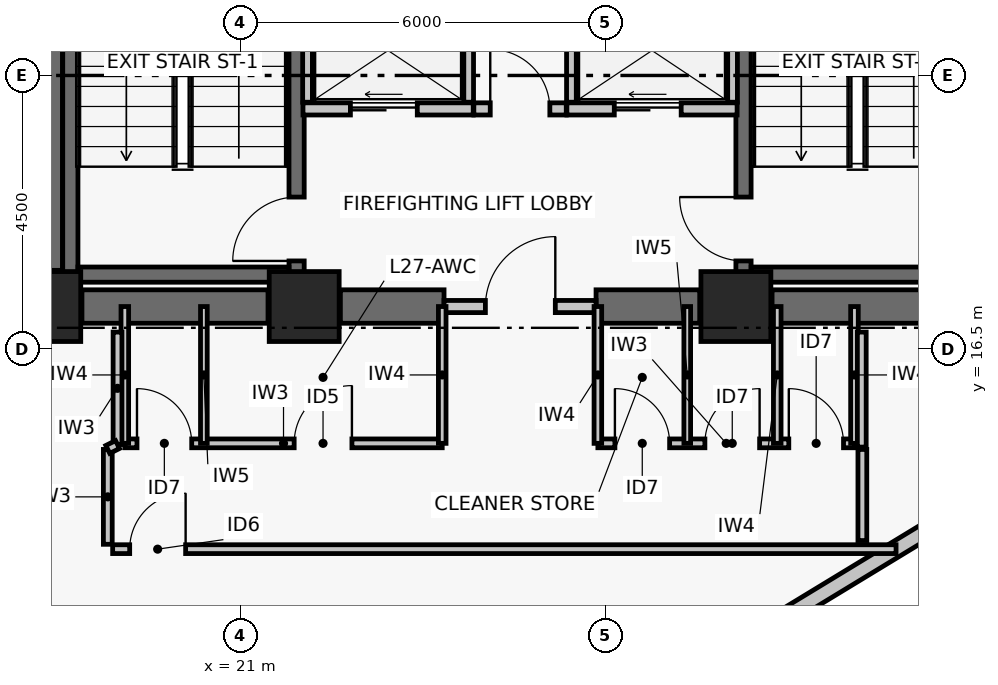
"""IFC4 building model, lengths in metres.
Left out: names, types, materials, properties, quantities, classifications, styles, units other than length and angle.
Written with IfcOpenShell. Run it as: python <this file> out.ifc"""

import sys

from ifc_helpers import new_model, si_unit, direction, frame, frame_2d, origin, origin_2d, place, context, subcontext, project, spatial, rectangle, extrude, element, fill, save


model = new_model("IFC4")
c1 = context("Model", 3, precision=1e-05, world=origin(), true_north=direction((0.0, 1.0)))
c2 = subcontext(c1, "Body", "Model", "MODEL_VIEW")
j1 = project(units=[si_unit("LENGTHUNIT", "METRE"), si_unit("PLANEANGLEUNIT", "RADIAN")], contexts=[c1])
p1 = place(None, origin())
s1 = spatial("IfcSite", under=j1, at=p1, CompositionType="ELEMENT")
p2 = place(p1, origin())
s2 = spatial("IfcBuilding", under=s1, at=p2, CompositionType="ELEMENT")
p3 = place(p2, frame((0.0, 0.0, 111.42)))
s3 = spatial("IfcBuildingStorey", under=s2, at=p3, CompositionType="ELEMENT", Elevation=111.42)
for number, where, z_axis, x_axis in (
    (1, (17.8, 17.2, 0.0), (0.0, 0.0, 1.0), (1.0, 0.0, 0.0)),
    (2, (22.05, 17.2, 0.0), (0.0, 0.0, 1.0), (1.0, 0.0, 0.0)),
    (3, (29.15, 17.2, 0.0), (0.0, 0.0, 1.0), (1.0, 0.0, 0.0)),
):
    element("IfcColumn", number, at=place(p3, frame(where, z_axis=z_axis, x_axis=x_axis)), inside=s3, PredefinedType="COLUMN", context=c2, shape_type="SweptSolid", body=[
        extrude(rectangle(XDim=1.15, YDim=1.15, at=origin_2d()), origin(), (0.0, 0.0, 1.0), 3.72),
    ])
p4 = place(p3, frame((18.395, 17.2, 0.0), z_axis=(0.0, 0.0, 1.0), x_axis=(1.0, 0.0, 0.0)))
e4 = element("IfcWall", 4, at=p4, inside=s3, PredefinedType="SHEAR", context=c2, shape_type="SweptSolid", body=[
    extrude(rectangle(XDim=3.06, YDim=0.55, at=frame_2d((1.53, 0.0))), origin(), (0.0, 0.0, 1.0), 3.47),
])
p5 = place(p3, frame((22.645, 17.2, 0.0), z_axis=(0.0, 0.0, 1.0), x_axis=(1.0, 0.0, 0.0)))
e5 = element("IfcWall", 5, at=p5, inside=s3, PredefinedType="SHEAR", context=c2, shape_type="SweptSolid", body=[
    extrude(rectangle(XDim=1.705, YDim=0.55, at=frame_2d((0.853, 0.0))), origin(), (0.0, 0.0, 1.0), 3.47),
])
p6 = place(p3, frame((26.85, 17.2, 0.0), z_axis=(0.0, 0.0, 1.0), x_axis=(1.0, 0.0, 0.0)))
e6 = element("IfcWall", 6, at=p6, inside=s3, PredefinedType="SHEAR", context=c2, shape_type="SweptSolid", body=[
    extrude(rectangle(XDim=1.705, YDim=0.55, at=frame_2d((0.853, 0.0))), origin(), (0.0, 0.0, 1.0), 3.47),
])
p7 = place(p3, frame((29.745, 17.2, 0.0), z_axis=(0.0, 0.0, 1.0), x_axis=(1.0, 0.0, 0.0)))
e7 = element("IfcWall", 7, at=p7, inside=s3, PredefinedType="SHEAR", context=c2, shape_type="SweptSolid", body=[
    extrude(rectangle(XDim=3.06, YDim=0.55, at=frame_2d((1.53, 0.0))), origin(), (0.0, 0.0, 1.0), 3.47),
])
p8 = place(p3, frame((17.8, 17.795, 0.0), z_axis=(0.0, 0.0, 1.0), x_axis=(0.0, 1.0, 0.0)))
e8 = element("IfcWall", 8, at=p8, inside=s3, PredefinedType="SHEAR", context=c2, shape_type="SweptSolid", body=[
    extrude(rectangle(XDim=8.41, YDim=0.55, at=frame_2d((4.205, 0.0))), origin(), (0.0, 0.0, 1.0), 3.47),
])
p9 = place(p3, frame((18.204, 17.6, 0.0), z_axis=(0.0, 0.0, 1.0), x_axis=(0.0, 1.0, 0.0)))
e9 = element("IfcWall", 9, at=p9, inside=s3, PredefinedType="SHEAR", context=c2, shape_type="SweptSolid", body=[
    extrude(rectangle(XDim=8.8, YDim=0.25, at=frame_2d((4.4, 0.0))), origin(), (0.0, 0.0, 1.0), 3.47),
])
p10 = place(p3, frame((21.925, 17.6, 0.0), z_axis=(0.0, 0.0, 1.0), x_axis=(0.0, 1.0, 0.0)))
e10 = element("IfcWall", 10, at=p10, inside=s3, PredefinedType="SHEAR", context=c2, shape_type="SweptSolid", body=[
    extrude(rectangle(XDim=8.8, YDim=0.25, at=frame_2d((4.4, 0.0))), origin(), (0.0, 0.0, 1.0), 3.47),
])
p11 = place(p10, frame((0.35, 0.0, 0.0)))
e11 = element("IfcOpeningElement", 11, at=p11, cuts=e10, PredefinedType="OPENING", context=c2, shape_type="SweptSolid", body=[
    extrude(rectangle(XDim=1.05, YDim=2.08, at=frame_2d((0.525, 1.04))), frame((0.0, 0.135, 0.0), z_axis=(0.0, -1.0, 0.0), x_axis=(1.0, 0.0, 0.0)), (0.0, 0.0, 1.0), 0.27),
])
p12 = place(p3, frame((18.329, 17.725, 0.0), z_axis=(0.0, 0.0, 1.0), x_axis=(1.0, 0.0, 0.0)))
e12 = element("IfcWall", 12, at=p12, inside=s3, PredefinedType="SHEAR", context=c2, shape_type="SweptSolid", body=[
    extrude(rectangle(XDim=3.471, YDim=0.25, at=frame_2d((1.735, 0.0))), origin(), (0.0, 0.0, 1.0), 3.47),
])
p13 = place(p3, frame((29.275, 17.6, 0.0), z_axis=(0.0, 0.0, 1.0), x_axis=(0.0, 1.0, 0.0)))
e13 = element("IfcWall", 13, at=p13, inside=s3, PredefinedType="SHEAR", context=c2, shape_type="SweptSolid", body=[
    extrude(rectangle(XDim=8.8, YDim=0.25, at=frame_2d((4.4, 0.0))), origin(), (0.0, 0.0, 1.0), 3.47),
])
p14 = place(p13, frame((0.35, 0.0, 0.0)))
e14 = element("IfcOpeningElement", 14, at=p14, cuts=e13, PredefinedType="OPENING", context=c2, shape_type="SweptSolid", body=[
    extrude(rectangle(XDim=1.05, YDim=2.08, at=frame_2d((0.525, 1.04))), frame((0.0, 0.135, 0.0), z_axis=(0.0, -1.0, 0.0), x_axis=(1.0, 0.0, 0.0)), (0.0, 0.0, 1.0), 0.27),
])
p15 = place(p3, frame((29.4, 17.725, 0.0), z_axis=(0.0, 0.0, 1.0), x_axis=(1.0, 0.0, 0.0)))
e15 = element("IfcWall", 15, at=p15, inside=s3, PredefinedType="SHEAR", context=c2, shape_type="SweptSolid", body=[
    extrude(rectangle(XDim=3.471, YDim=0.25, at=frame_2d((1.736, 0.0))), origin(), (0.0, 0.0, 1.0), 3.47),
])
p16 = place(p3, frame((35.48, 15.455, 0.0), z_axis=(0.0, 0.0, 1.0), x_axis=(-0.854673977685, -0.51916509115, 0.0)))
e16 = element("IfcWall", 16, at=p16, inside=s3, PredefinedType="PARTITIONING", context=c2, shape_type="SweptSolid", body=[
    extrude(rectangle(XDim=6.678, YDim=0.26, at=frame_2d((3.339, 0.0))), origin(), (0.0, 0.0, 1.0), 3.47),
])
p17 = place(p3, frame((24.35, 17.2, 0.0), z_axis=(0.0, 0.0, 1.0), x_axis=(1.0, 0.0, 0.0)))
e17 = element("IfcWall", 17, at=p17, inside=s3, PredefinedType="PARTITIONING", context=c2, shape_type="SweptSolid", body=[
    extrude(rectangle(XDim=2.5, YDim=0.2, at=frame_2d((1.25, 0.0))), origin(), (0.0, 0.0, 1.0), 2.6),
])
p18 = place(p17, frame((0.68, 0.0, 0.0)))
e18 = element("IfcOpeningElement", 18, at=p18, cuts=e17, PredefinedType="OPENING", context=c2, shape_type="SweptSolid", body=[
    extrude(rectangle(XDim=1.15, YDim=2.08, at=frame_2d((0.575, 1.04))), frame((0.0, 0.11, 0.0), z_axis=(0.0, -1.0, 0.0), x_axis=(1.0, 0.0, 0.0)), (0.0, 0.0, 1.0), 0.22),
])
p19 = place(p3, frame((24.84, 20.45, 0.0), z_axis=(0.0, 0.0, 1.0), x_axis=(1.0, 0.0, 0.0)))
e19 = element("IfcWall", 19, at=p19, inside=s3, PredefinedType="PARTITIONING", context=c2, shape_type="SweptSolid", body=[
    extrude(rectangle(XDim=1.52, YDim=0.2, at=frame_2d((0.76, 0.0))), origin(), (0.0, 0.0, 1.0), 3.47),
])
p20 = place(p19, frame((0.27, 0.0, 0.0)))
e20 = element("IfcOpeningElement", 20, at=p20, cuts=e19, PredefinedType="OPENING", context=c2, shape_type="SweptSolid", body=[
    extrude(rectangle(XDim=0.98, YDim=2.06, at=frame_2d((0.49, 1.03))), frame((0.0, 0.11, 0.0), z_axis=(0.0, -1.0, 0.0), x_axis=(1.0, 0.0, 0.0)), (0.0, 0.0, 1.0), 0.22),
])
p21 = place(p3, frame((22.03, 20.45, 0.0), z_axis=(0.0, 0.0, 1.0), x_axis=(1.0, 0.0, 0.0)))
e21 = element("IfcWall", 21, at=p21, inside=s3, PredefinedType="PARTITIONING", context=c2, shape_type="SweptSolid", body=[
    extrude(rectangle(XDim=2.8, YDim=0.2, at=frame_2d((1.4, 0.0))), origin(), (0.0, 0.0, 1.0), 3.47),
])
p22 = place(p21, frame((0.78, 0.0, 0.0)))
e22 = element("IfcOpeningElement", 22, at=p22, cuts=e21, PredefinedType="OPENING", context=c2, shape_type="SweptSolid", body=[
    extrude(rectangle(XDim=1.1, YDim=2.08, at=frame_2d((0.55, 1.04))), frame((0.0, 0.11, 0.0), z_axis=(0.0, -1.0, 0.0), x_axis=(1.0, 0.0, 0.0)), (0.0, 0.0, 1.0), 0.22),
])
p23 = place(p3, frame((26.37, 20.45, 0.0), z_axis=(0.0, 0.0, 1.0), x_axis=(1.0, 0.0, 0.0)))
e23 = element("IfcWall", 23, at=p23, inside=s3, PredefinedType="PARTITIONING", context=c2, shape_type="SweptSolid", body=[
    extrude(rectangle(XDim=2.8, YDim=0.2, at=frame_2d((1.4, 0.0))), origin(), (0.0, 0.0, 1.0), 3.47),
])
p24 = place(p23, frame((0.78, 0.0, 0.0)))
e24 = element("IfcOpeningElement", 24, at=p24, cuts=e23, PredefinedType="OPENING", context=c2, shape_type="SweptSolid", body=[
    extrude(rectangle(XDim=1.1, YDim=2.08, at=frame_2d((0.55, 1.04))), frame((0.0, 0.11, 0.0), z_axis=(0.0, -1.0, 0.0), x_axis=(1.0, 0.0, 0.0)), (0.0, 0.0, 1.0), 0.22),
])
for number, where, z_axis, x_axis in (
    (25, (22.105, 20.56, 0.0), (0.0, 0.0, 1.0), (0.0, 1.0, 0.0)),
    (26, (24.755, 20.56, 0.0), (0.0, 0.0, 1.0), (0.0, 1.0, 0.0)),
):
    element("IfcWall", number, at=place(p3, frame(where, z_axis=z_axis, x_axis=x_axis)), inside=s3, PredefinedType="PARTITIONING", context=c2, shape_type="SweptSolid", body=[
        extrude(rectangle(XDim=1.71, YDim=0.16, at=frame_2d((0.855, 0.0))), origin(), (0.0, 0.0, 1.0), 3.47),
    ])
p25 = place(p3, frame((29.095, 20.56, 0.0), z_axis=(0.0, 0.0, 1.0), x_axis=(0.0, 1.0, 0.0)))
e27 = element("IfcWall", 27, at=p25, inside=s3, PredefinedType="PARTITIONING", context=c2, shape_type="SweptSolid", body=[
    extrude(rectangle(XDim=5.45, YDim=0.16, at=frame_2d((2.725, 0.0))), origin(), (0.0, 0.0, 1.0), 3.47),
])
p26 = place(p3, frame((26.445, 20.56, 0.0), z_axis=(0.0, 0.0, 1.0), x_axis=(0.0, 1.0, 0.0)))
e28 = element("IfcWall", 28, at=p26, inside=s3, PredefinedType="PARTITIONING", context=c2, shape_type="SweptSolid", body=[
    extrude(rectangle(XDim=1.71, YDim=0.16, at=frame_2d((0.855, 0.0))), origin(), (0.0, 0.0, 1.0), 3.47),
])
p27 = place(p3, frame((19.1, 14.95, 0.0), z_axis=(0.0, 0.0, 1.0), x_axis=(1.0, 0.0, 0.0)))
e29 = element("IfcWall", 29, at=p27, inside=s3, PredefinedType="PARTITIONING", context=c2, shape_type="SweptSolid", body=[
    extrude(rectangle(XDim=5.22, YDim=0.145, at=frame_2d((2.61, 0.0))), origin(), (0.0, 0.0, 1.0), 2.65),
])
p28 = place(p27, frame((0.2, 0.0, 0.0)))
e30 = element("IfcOpeningElement", 30, at=p28, cuts=e29, PredefinedType="OPENING", context=c2, shape_type="SweptSolid", body=[
    extrude(rectangle(XDim=0.9, YDim=2.02, at=frame_2d((0.45, 1.01))), frame((0.0, 0.083, 0.0), z_axis=(0.0, -1.0, 0.0), x_axis=(1.0, 0.0, 0.0)), (0.0, 0.0, 1.0), 0.165),
])
p29 = place(p27, frame((2.785, 0.0, 0.0)))
e31 = element("IfcOpeningElement", 31, at=p29, cuts=e29, PredefinedType="OPENING", context=c2, shape_type="SweptSolid", body=[
    extrude(rectangle(XDim=0.95, YDim=2.06, at=frame_2d((0.475, 1.03))), frame((0.0, 0.083, 0.0), z_axis=(0.0, -1.0, 0.0), x_axis=(1.0, 0.0, 0.0)), (0.0, 0.0, 1.0), 0.165),
])
p30 = place(p3, frame((26.88, 14.95, 0.0), z_axis=(0.0, 0.0, 1.0), x_axis=(1.0, 0.0, 0.0)))
e32 = element("IfcWall", 32, at=p30, inside=s3, PredefinedType="PARTITIONING", context=c2, shape_type="SweptSolid", body=[
    extrude(rectangle(XDim=4.22, YDim=0.145, at=frame_2d((2.11, 0.0))), origin(), (0.0, 0.0, 1.0), 3.05),
])
p31 = place(p30, frame((0.28, 0.0, 0.0)))
e33 = element("IfcOpeningElement", 33, at=p31, cuts=e32, PredefinedType="OPENING", context=c2, shape_type="SweptSolid", body=[
    extrude(rectangle(XDim=0.9, YDim=2.02, at=frame_2d((0.45, 1.01))), frame((0.0, 0.083, 0.0), z_axis=(0.0, -1.0, 0.0), x_axis=(1.0, 0.0, 0.0)), (0.0, 0.0, 1.0), 0.165),
])
p32 = place(p30, frame((1.76, 0.0, 0.0)))
e34 = element("IfcOpeningElement", 34, at=p32, cuts=e32, PredefinedType="OPENING", context=c2, shape_type="SweptSolid", body=[
    extrude(rectangle(XDim=0.9, YDim=2.02, at=frame_2d((0.45, 1.01))), frame((0.0, 0.083, 0.0), z_axis=(0.0, -1.0, 0.0), x_axis=(1.0, 0.0, 0.0)), (0.0, 0.0, 1.0), 0.165),
])
p33 = place(p30, frame((3.14, 0.0, 0.0)))
e35 = element("IfcOpeningElement", 35, at=p33, cuts=e32, PredefinedType="OPENING", context=c2, shape_type="SweptSolid", body=[
    extrude(rectangle(XDim=0.9, YDim=2.02, at=frame_2d((0.45, 1.01))), frame((0.0, 0.083, 0.0), z_axis=(0.0, -1.0, 0.0), x_axis=(1.0, 0.0, 0.0)), (0.0, 0.0, 1.0), 0.165),
])
p34 = place(p3, frame((19.1, 14.95, 0.0), z_axis=(0.0, 0.0, 1.0), x_axis=(0.0, 1.0, 0.0)))
e36 = element("IfcWall", 36, at=p34, inside=s3, PredefinedType="PARTITIONING", context=c2, shape_type="SweptSolid", body=[
    extrude(rectangle(XDim=2.25, YDim=0.125, at=frame_2d((1.125, 0.0))), origin(), (0.0, 0.0, 1.0), 2.6),
])
p35 = place(p3, frame((20.4, 14.95, 0.0), z_axis=(0.0, 0.0, 1.0), x_axis=(0.0, 1.0, 0.0)))
e37 = element("IfcWall", 37, at=p35, inside=s3, PredefinedType="PARTITIONING", context=c2, shape_type="SweptSolid", body=[
    extrude(rectangle(XDim=2.25, YDim=0.11, at=frame_2d((1.125, 0.0))), origin(), (0.0, 0.0, 1.0), 2.6),
])
for number, where, z_axis, x_axis in (
    (38, (24.32, 14.95, 0.0), (0.0, 0.0, 1.0), (0.0, 1.0, 0.0)),
    (39, (26.88, 14.95, 0.0), (0.0, 0.0, 1.0), (0.0, 1.0, 0.0)),
):
    element("IfcWall", number, at=place(p3, frame(where, z_axis=z_axis, x_axis=x_axis)), inside=s3, PredefinedType="PARTITIONING", context=c2, shape_type="SweptSolid", body=[
        extrude(rectangle(XDim=2.25, YDim=0.125, at=frame_2d((1.125, 0.0))), origin(), (0.0, 0.0, 1.0), 2.6),
    ])
p36 = place(p3, frame((28.35, 14.95, 0.0), z_axis=(0.0, 0.0, 1.0), x_axis=(0.0, 1.0, 0.0)))
e40 = element("IfcWall", 40, at=p36, inside=s3, PredefinedType="PARTITIONING", context=c2, shape_type="SweptSolid", body=[
    extrude(rectangle(XDim=2.25, YDim=0.11, at=frame_2d((1.125, 0.0))), origin(), (0.0, 0.0, 1.0), 2.6),
])
for number, where, z_axis, x_axis in (
    (41, (29.83, 14.95, 0.0), (0.0, 0.0, 1.0), (0.0, 1.0, 0.0)),
    (42, (31.1, 14.95, 0.0), (0.0, 0.0, 1.0), (0.0, 1.0, 0.0)),
):
    element("IfcWall", number, at=place(p3, frame(where, z_axis=z_axis, x_axis=x_axis)), inside=s3, PredefinedType="PARTITIONING", context=c2, shape_type="SweptSolid", body=[
        extrude(rectangle(XDim=2.25, YDim=0.125, at=frame_2d((1.125, 0.0))), origin(), (0.0, 0.0, 1.0), 2.6),
    ])
p37 = place(p3, frame((18.98, 16.78, 0.0), z_axis=(0.0, 0.0, 1.0), x_axis=(0.0, -1.0, 0.0)))
e43 = element("IfcWall", 43, at=p37, inside=s3, PredefinedType="PARTITIONING", context=c2, shape_type="SweptSolid", body=[
    extrude(rectangle(XDim=1.85, YDim=0.145, at=frame_2d((0.925, 0.0))), origin(), (0.0, 0.0, 1.0), 2.6),
])
p38 = place(p3, frame((18.82, 14.85, 0.0), z_axis=(0.0, 0.0, 1.0), x_axis=(0.0, -1.0, 0.0)))
e44 = element("IfcWall", 44, at=p38, inside=s3, PredefinedType="PARTITIONING", context=c2, shape_type="SweptSolid", body=[
    extrude(rectangle(XDim=1.56, YDim=0.145, at=frame_2d((0.78, 0.0))), origin(), (0.0, 0.0, 1.0), 3.05),
])
p39 = place(p3, frame((18.9, 13.21, 0.0), z_axis=(0.0, 0.0, 1.0), x_axis=(1.0, 0.0, 0.0)))
e45 = element("IfcWall", 45, at=p39, inside=s3, PredefinedType="PARTITIONING", context=c2, shape_type="SweptSolid", body=[
    extrude(rectangle(XDim=12.884, YDim=0.145, at=frame_2d((6.442, 0.0))), origin(), (0.0, 0.0, 1.0), 2.65),
])
p40 = place(p39, frame((0.28, 0.0, 0.0)))
e46 = element("IfcOpeningElement", 46, at=p40, cuts=e45, PredefinedType="OPENING", context=c2, shape_type="SweptSolid", body=[
    extrude(rectangle(XDim=0.92, YDim=2.05, at=frame_2d((0.46, 1.025))), frame((0.0, 0.083, 0.0), z_axis=(0.0, -1.0, 0.0), x_axis=(1.0, 0.0, 0.0)), (0.0, 0.0, 1.0), 0.165),
])
p41 = place(p3, frame((31.23, 13.351, 0.0), z_axis=(0.0, 0.0, 1.0), x_axis=(0.0, 1.0, 0.0)))
e47 = element("IfcWall", 47, at=p41, inside=s3, PredefinedType="PARTITIONING", context=c2, shape_type="SweptSolid", body=[
    extrude(rectangle(XDim=1.499, YDim=0.145, at=frame_2d((0.75, 0.0))), origin(), (0.0, 0.0, 1.0), 2.9),
])
p42 = place(p3, frame((31.22, 14.889, 0.0), z_axis=(0.0, 0.0, 1.0), x_axis=(0.0, 1.0, 0.0)))
e48 = element("IfcWall", 48, at=p42, inside=s3, PredefinedType="PARTITIONING", context=c2, shape_type="SweptSolid", body=[
    extrude(rectangle(XDim=1.891, YDim=0.145, at=frame_2d((0.946, 0.0))), origin(), (0.0, 0.0, 1.0), 2.6),
])
p43 = place(p3, frame((18.82, 14.85, 0.0), z_axis=(0.0, 0.0, 1.0), x_axis=(0.89470021502, 0.446667130247, 0.0)))
e49 = element("IfcWall", 49, at=p43, inside=s3, PredefinedType="PARTITIONING", context=c2, shape_type="SweptSolid", body=[
    extrude(rectangle(XDim=0.179, YDim=0.145, at=frame_2d((0.089, 0.0))), origin(), (0.0, 0.0, 1.0), 3.47),
])
p44 = place(p11, origin())
e50 = element("IfcDoor", 50, at=p44, inside=s3, OperationType="SINGLE_SWING_LEFT", PredefinedType="DOOR", context=c2, shape_type="SweptSolid", body=[
    extrude(rectangle(XDim=1.05, YDim=2.08, at=frame_2d((0.525, 1.04))), frame((0.0, 0.025, 0.0), z_axis=(0.0, -1.0, 0.0), x_axis=(1.0, 0.0, 0.0)), (0.0, 0.0, 1.0), 0.05),
])
fill(e11, e50)
p45 = place(p14, origin())
e51 = element("IfcDoor", 51, at=p45, inside=s3, OperationType="SINGLE_SWING_RIGHT", PredefinedType="DOOR", context=c2, shape_type="SweptSolid", body=[
    extrude(rectangle(XDim=1.05, YDim=2.08, at=frame_2d((0.525, 1.04))), frame((0.0, 0.025, 0.0), z_axis=(0.0, -1.0, 0.0), x_axis=(1.0, 0.0, 0.0)), (0.0, 0.0, 1.0), 0.05),
])
fill(e14, e51)
p46 = place(p18, origin())
e52 = element("IfcDoor", 52, at=p46, inside=s3, OperationType="SINGLE_SWING_RIGHT", PredefinedType="DOOR", context=c2, shape_type="SweptSolid", body=[
    extrude(rectangle(XDim=1.15, YDim=2.08, at=frame_2d((0.575, 1.04))), frame((0.0, 0.025, 0.0), z_axis=(0.0, -1.0, 0.0), x_axis=(1.0, 0.0, 0.0)), (0.0, 0.0, 1.0), 0.05),
])
fill(e18, e52)
p47 = place(p20, origin())
e53 = element("IfcDoor", 53, at=p47, inside=s3, OperationType="SINGLE_SWING_LEFT", PredefinedType="DOOR", context=c2, shape_type="SweptSolid", body=[
    extrude(rectangle(XDim=0.98, YDim=2.06, at=frame_2d((0.49, 1.03))), frame((0.0, 0.025, 0.0), z_axis=(0.0, -1.0, 0.0), x_axis=(1.0, 0.0, 0.0)), (0.0, 0.0, 1.0), 0.05),
])
fill(e20, e53)
p48 = place(p22, origin())
e54 = element("IfcDoor", 54, at=p48, inside=s3, OperationType="DOUBLE_DOOR_SLIDING", PredefinedType="DOOR", context=c2, shape_type="SweptSolid", body=[
    extrude(rectangle(XDim=1.1, YDim=2.08, at=frame_2d((0.55, 1.04))), frame((0.0, 0.025, 0.0), z_axis=(0.0, -1.0, 0.0), x_axis=(1.0, 0.0, 0.0)), (0.0, 0.0, 1.0), 0.05),
])
fill(e22, e54)
p49 = place(p24, origin())
e55 = element("IfcDoor", 55, at=p49, inside=s3, OperationType="DOUBLE_DOOR_SLIDING", PredefinedType="DOOR", context=c2, shape_type="SweptSolid", body=[
    extrude(rectangle(XDim=1.1, YDim=2.08, at=frame_2d((0.55, 1.04))), frame((0.0, 0.025, 0.0), z_axis=(0.0, -1.0, 0.0), x_axis=(1.0, 0.0, 0.0)), (0.0, 0.0, 1.0), 0.05),
])
fill(e24, e55)
p50 = place(p28, origin())
e56 = element("IfcDoor", 56, at=p50, inside=s3, OperationType="SINGLE_SWING_LEFT", PredefinedType="DOOR", context=c2, shape_type="SweptSolid", body=[
    extrude(rectangle(XDim=0.9, YDim=2.02, at=frame_2d((0.45, 1.01))), frame((0.0, 0.025, 0.0), z_axis=(0.0, -1.0, 0.0), x_axis=(1.0, 0.0, 0.0)), (0.0, 0.0, 1.0), 0.05),
])
fill(e30, e56)
p51 = place(p29, origin())
e57 = element("IfcDoor", 57, at=p51, inside=s3, OperationType="SINGLE_SWING_RIGHT", PredefinedType="DOOR", context=c2, shape_type="SweptSolid", body=[
    extrude(rectangle(XDim=0.95, YDim=2.06, at=frame_2d((0.475, 1.03))), frame((0.0, 0.025, 0.0), z_axis=(0.0, -1.0, 0.0), x_axis=(1.0, 0.0, 0.0)), (0.0, 0.0, 1.0), 0.05),
])
fill(e31, e57)
p52 = place(p31, origin())
e58 = element("IfcDoor", 58, at=p52, inside=s3, OperationType="SINGLE_SWING_LEFT", PredefinedType="DOOR", context=c2, shape_type="SweptSolid", body=[
    extrude(rectangle(XDim=0.9, YDim=2.02, at=frame_2d((0.45, 1.01))), frame((0.0, 0.025, 0.0), z_axis=(0.0, -1.0, 0.0), x_axis=(1.0, 0.0, 0.0)), (0.0, 0.0, 1.0), 0.05),
])
fill(e33, e58)
p53 = place(p32, origin())
e59 = element("IfcDoor", 59, at=p53, inside=s3, OperationType="SINGLE_SWING_RIGHT", PredefinedType="DOOR", context=c2, shape_type="SweptSolid", body=[
    extrude(rectangle(XDim=0.9, YDim=2.02, at=frame_2d((0.45, 1.01))), frame((0.0, 0.025, 0.0), z_axis=(0.0, -1.0, 0.0), x_axis=(1.0, 0.0, 0.0)), (0.0, 0.0, 1.0), 0.05),
])
fill(e34, e59)
p54 = place(p33, origin())
e60 = element("IfcDoor", 60, at=p54, inside=s3, OperationType="SINGLE_SWING_LEFT", PredefinedType="DOOR", context=c2, shape_type="SweptSolid", body=[
    extrude(rectangle(XDim=0.9, YDim=2.02, at=frame_2d((0.45, 1.01))), frame((0.0, 0.025, 0.0), z_axis=(0.0, -1.0, 0.0), x_axis=(1.0, 0.0, 0.0)), (0.0, 0.0, 1.0), 0.05),
])
fill(e35, e60)
p55 = place(p40, origin())
e61 = element("IfcDoor", 61, at=p55, inside=s3, OperationType="SINGLE_SWING_RIGHT", PredefinedType="DOOR", context=c2, shape_type="SweptSolid", body=[
    extrude(rectangle(XDim=0.92, YDim=2.05, at=frame_2d((0.46, 1.025))), frame((0.0, 0.025, 0.0), z_axis=(0.0, -1.0, 0.0), x_axis=(1.0, 0.0, 0.0)), (0.0, 0.0, 1.0), 0.05),
])
fill(e46, e61)
save(model, sys.argv[1])
